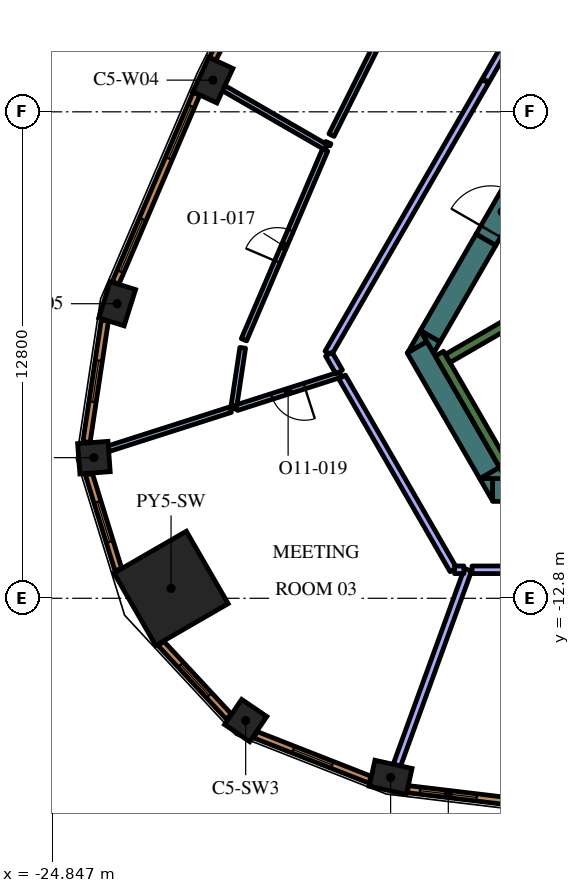
"""IFC4 building model, lengths in metres.
Left out: names, types, materials, properties, quantities, classifications, styles, units other than length and angle.
Written with IfcOpenShell. Run it as: python <this file> out.ifc"""

import sys

from ifc_helpers import new_model, si_unit, direction, frame, frame_2d, origin, origin_2d, place, context, subcontext, project, spatial, polyline, rectangle, outline, extrude, element, fill, save


model = new_model("IFC4")
c1 = context("Model", 3, precision=1e-05, world=origin(), true_north=direction((0.0, 1.0)))
c2 = subcontext(c1, "Body", "Model", "MODEL_VIEW")
j1 = project(units=[si_unit("LENGTHUNIT", "METRE"), si_unit("PLANEANGLEUNIT", "RADIAN")], contexts=[c1])
p1 = place(None, origin())
s1 = spatial("IfcSite", under=j1, at=p1, CompositionType="ELEMENT")
p2 = place(p1, origin())
s2 = spatial("IfcBuilding", under=s1, at=p2, CompositionType="ELEMENT")
p3 = place(p2, frame((0.0, 0.0, 275.4)))
s3 = spatial("IfcBuildingStorey", under=s2, at=p3, CompositionType="ELEMENT", Elevation=275.4)
p4 = place(p3, frame((-21.718, -12.539, 0.0), z_axis=(0.0, 0.0, 1.0), x_axis=(-0.866025403784, -0.5, 0.0)))
e1 = element("IfcColumn", 1, at=p4, inside=s3, PredefinedType="COLUMN", context=c2, shape_type="SweptSolid", body=[
    extrude(rectangle(XDim=2.2, YDim=2.2, at=origin_2d()), origin(), (0.0, 0.0, 1.0), 4.2),
])
for number, where, z_axis, x_axis in (
    (2, (-15.941, -17.512, 0.0), (0.0, 0.0, 1.0), (0.976, -0.217, 0.0)),
    (3, (-20.619, 0.834, 0.0), (0.0, 0.0, 1.0), (-0.421, -0.907, 0.0)),
    (4, (-23.136, -5.049, 0.0), (0.0, 0.0, 1.0), (-0.3, -0.954, 0.0)),
):
    element("IfcColumn", number, at=place(p3, frame(where, z_axis=z_axis, x_axis=x_axis)), inside=s3, PredefinedType="COLUMN", context=c2, shape_type="SweptSolid", body=[
        extrude(rectangle(XDim=1.0, YDim=0.7, at=origin_2d()), origin(), (0.0, 0.0, 1.0), 4.2),
    ])
for number, where, z_axis, x_axis in (
    (5, (-23.748, -9.1, 0.0), (0.0, 0.0, 1.0), (0.075, -0.997, 0.0)),
    (6, (-19.754, -16.017, 0.0), (0.0, 0.0, 1.0), (0.826, -0.563, 0.0)),
):
    element("IfcColumn", number, at=place(p3, frame(where, z_axis=z_axis, x_axis=x_axis)), inside=s3, PredefinedType="COLUMN", context=c2, shape_type="SweptSolid", body=[
        extrude(rectangle(XDim=0.8, YDim=0.8, at=origin_2d()), origin(), (0.0, 0.0, 1.0), 4.2),
    ])
p5 = place(p3, frame((8.904, -9.95, 0.0), z_axis=(0.0, 0.0, 1.0), x_axis=(-1.0, 0.0, 0.0)))
e7 = element("IfcWall", 7, at=p5, inside=s3, PredefinedType="SOLIDWALL", context=c2, shape_type="SweptSolid", body=[
    extrude(rectangle(XDim=22.161, YDim=0.6, at=frame_2d((11.081, 0.0))), origin(), (0.0, 0.0, 1.0), 4.2),
])
p6 = place(p3, origin())
e8 = element("IfcWall", 8, at=p6, inside=s3, PredefinedType="SOLIDWALL", context=c2, shape_type="SweptSolid", body=[
    extrude(outline(polyline([(-13.597, -9.65), (-13.259, -9.65), (-13.259, -10.236), (-13.597, -9.65)])), origin(), (0.0, 0.0, 1.0), 4.2),
])
p7 = place(p3, frame((-13.333, -9.506, 0.0), z_axis=(0.0, 0.0, 1.0), x_axis=(-0.500019073792, 0.866014391245, 0.0)))
e9 = element("IfcWall", 9, at=p7, inside=s3, PredefinedType="SOLIDWALL", context=c2, shape_type="SweptSolid", body=[
    extrude(rectangle(XDim=3.823, YDim=0.6, at=frame_2d((1.912, 0.0))), origin(), (0.0, 0.0, 1.0), 4.2),
])
e10 = element("IfcWall", 10, at=p6, inside=s3, PredefinedType="SOLIDWALL", context=c2, shape_type="SweptSolid", body=[
    extrude(outline(polyline([(-14.987, -6.043), (-15.493, -6.335), (-15.156, -5.75), (-14.987, -6.043)])), origin(), (0.0, 0.0, 1.0), 4.2),
])
e11 = element("IfcWall", 11, at=p6, inside=s3, PredefinedType="SOLIDWALL", context=c2, shape_type="SweptSolid", body=[
    extrude(outline(polyline([(-12.904, -9.65), (-13.58, -9.65), (-13.073, -9.357), (-12.904, -9.65)])), origin(), (0.0, 0.0, 1.0), 4.2),
])
p8 = place(p3, frame((-13.432, -3.364, 0.0), z_axis=(0.0, 0.0, 1.0), x_axis=(-0.499960127962, -0.866048422692, 0.0)))
e12 = element("IfcWall", 12, at=p8, inside=s3, PredefinedType="SOLIDWALL", context=c2, shape_type="SweptSolid", body=[
    extrude(rectangle(XDim=2.934, YDim=0.6, at=frame_2d((1.467, 0.0))), origin(), (0.0, 0.0, 1.0), 4.2),
])
e13 = element("IfcWall", 13, at=p6, inside=s3, PredefinedType="SOLIDWALL", context=c2, shape_type="SweptSolid", body=[
    extrude(outline(polyline([(-14.809, -6.35), (-15.147, -5.764), (-14.64, -6.057), (-14.809, -6.35)])), origin(), (0.0, 0.0, 1.0), 4.2),
])
p9 = place(p3, frame((-12.84, -9.511, 0.0), z_axis=(0.0, 0.0, 1.0), x_axis=(-0.499997733992, 0.866026712061, 0.0)))
e14 = element("IfcWall", 14, at=p9, inside=s3, PredefinedType="SOLIDWALL", context=c2, shape_type="SweptSolid", body=[
    extrude(rectangle(XDim=3.634, YDim=0.25, at=frame_2d((1.817, 0.0))), origin(), (0.0, 0.0, 1.0), 4.2),
])
p10 = place(p3, frame((-14.44, -6.49, 0.0), z_axis=(0.0, 0.0, 1.0), x_axis=(0.866022966069, 0.500004222222, 0.0)))
e15 = element("IfcWall", 15, at=p10, inside=s3, PredefinedType="SOLIDWALL", context=c2, shape_type="SweptSolid", body=[
    extrude(rectangle(XDim=6.8, YDim=0.25, at=frame_2d((3.4, 0.0))), origin(), (0.0, 0.0, 1.0), 4.2),
])
p11 = place(p3, frame((-13.432, -3.364, 0.0), z_axis=(0.0, 0.0, 1.0), x_axis=(0.500000056704, 0.866025371046, 0.0)))
e16 = element("IfcWall", 16, at=p11, inside=s3, PredefinedType="SOLIDWALL", context=c2, shape_type="SweptSolid", body=[
    extrude(rectangle(XDim=1.7, YDim=0.6, at=frame_2d((0.85, 0.0))), origin(), (0.0, 0.0, 1.0), 4.2),
])
p12 = place(p11, frame((0.25, 0.0, 0.0)))
e17 = element("IfcOpeningElement", 17, at=p12, cuts=e16, PredefinedType="OPENING", context=c2, shape_type="SweptSolid", body=[
    extrude(rectangle(XDim=1.2, YDim=2.1, at=frame_2d((0.6, 1.05))), frame((0.0, 0.31, 0.0), z_axis=(0.0, -1.0, 0.0), x_axis=(1.0, 0.0, 0.0)), (0.0, 0.0, 1.0), 0.62),
])
p13 = place(p3, frame((-15.774, -17.19, 0.0), z_axis=(0.0, 0.0, 1.0), x_axis=(0.341821907823, 0.93976474893, 0.0)))
e18 = element("IfcWall", 18, at=p13, inside=s3, PredefinedType="PARTITIONING", context=c2, shape_type="SweptSolid", body=[
    extrude(rectangle(XDim=5.469, YDim=0.2, at=frame_2d((2.735, 0.0))), origin(), (0.0, 0.0, 1.0), 3.55),
])
p14 = place(p3, frame((-13.799, -12.05, 0.0), z_axis=(0.0, 0.0, 1.0), x_axis=(1.0, 0.0, 0.0)))
e19 = element("IfcWall", 19, at=p14, inside=s3, PredefinedType="PARTITIONING", context=c2, shape_type="SweptSolid", body=[
    extrude(rectangle(XDim=7.769, YDim=0.2, at=frame_2d((3.884, 0.0))), origin(), (0.0, 0.0, 1.0), 3.55),
])
p15 = place(p3, frame((-17.635, -0.936, 0.0), z_axis=(0.0, 0.0, 1.0), x_axis=(-0.866044607523, 0.499966736674, 0.0)))
e20 = element("IfcWall", 20, at=p15, inside=s3, PredefinedType="PARTITIONING", context=c2, shape_type="SweptSolid", body=[
    extrude(rectangle(XDim=3.115, YDim=0.15, at=frame_2d((1.557, 0.0))), origin(), (0.0, 0.0, 1.0), 3.55),
])
p16 = place(p3, frame((-17.497, -0.613, 0.0), z_axis=(0.0, 0.0, 1.0), x_axis=(0.447474899467, 0.894296491297, 0.0)))
e21 = element("IfcWall", 21, at=p16, inside=s3, PredefinedType="PARTITIONING", context=c2, shape_type="SweptSolid", body=[
    extrude(rectangle(XDim=5.979, YDim=0.15, at=frame_2d((2.99, 0.0))), origin(), (0.0, 0.0, 1.0), 3.55),
])
p17 = place(p16, frame((2.58, 0.0, 0.0)))
e22 = element("IfcOpeningElement", 22, at=p17, cuts=e21, PredefinedType="OPENING", context=c2, shape_type="SweptSolid", body=[
    extrude(rectangle(XDim=0.9, YDim=2.1, at=frame_2d((0.45, 1.05))), frame((0.0, 0.085, 0.0), z_axis=(0.0, -1.0, 0.0), x_axis=(1.0, 0.0, 0.0)), (0.0, 0.0, 1.0), 0.17),
])
p18 = place(p3, frame((-17.581, -0.81, 0.0), z_axis=(0.0, 0.0, 1.0), x_axis=(-0.390033474923, -0.92080067791, 0.0)))
e23 = element("IfcWall", 23, at=p18, inside=s3, PredefinedType="PARTITIONING", context=c2, shape_type="SweptSolid", body=[
    extrude(rectangle(XDim=0.061, YDim=0.15, at=frame_2d((0.03, 0.0))), origin(), (0.0, 0.0, 1.0), 3.55),
])
p19 = place(p3, frame((-19.8, -5.998, 0.0), z_axis=(0.0, 0.0, 1.0), x_axis=(0.39332238233, 0.919400621904, 0.0)))
e24 = element("IfcWall", 24, at=p19, inside=s3, PredefinedType="PARTITIONING", context=c2, shape_type="SweptSolid", body=[
    extrude(rectangle(XDim=5.431, YDim=0.15, at=frame_2d((2.715, 0.0))), origin(), (0.0, 0.0, 1.0), 3.55),
])
p20 = place(p19, frame((2.231, 0.0, 0.0)))
e25 = element("IfcOpeningElement", 25, at=p20, cuts=e24, PredefinedType="OPENING", context=c2, shape_type="SweptSolid", body=[
    extrude(rectangle(XDim=0.9, YDim=2.1, at=frame_2d((0.45, 1.05))), frame((0.0, 0.085, 0.0), z_axis=(0.0, -1.0, 0.0), x_axis=(1.0, 0.0, 0.0)), (0.0, 0.0, 1.0), 0.17),
])
p21 = place(p3, frame((-19.833, -6.21, 0.0), z_axis=(0.0, 0.0, 1.0), x_axis=(-0.149305499664, -0.988791114326, 0.0)))
e26 = element("IfcWall", 26, at=p21, inside=s3, PredefinedType="PARTITIONING", context=c2, shape_type="SweptSolid", body=[
    extrude(rectangle(XDim=1.62, YDim=0.15, at=frame_2d((0.81, 0.0))), origin(), (0.0, 0.0, 1.0), 3.55),
])
p22 = place(p3, frame((-20.154, -7.838, 0.0), z_axis=(0.0, 0.0, 1.0), x_axis=(-0.952501497002, -0.304533903217, 0.0)))
e27 = element("IfcWall", 27, at=p22, inside=s3, PredefinedType="PARTITIONING", context=c2, shape_type="SweptSolid", body=[
    extrude(rectangle(XDim=3.37, YDim=0.15, at=frame_2d((1.685, 0.0))), origin(), (0.0, 0.0, 1.0), 3.55),
])
p23 = place(p3, frame((-17.256, -6.911, 0.0), z_axis=(0.0, 0.0, 1.0), x_axis=(-0.95247639241, -0.304612412587, 0.0)))
e28 = element("IfcWall", 28, at=p23, inside=s3, PredefinedType="PARTITIONING", context=c2, shape_type="SweptSolid", body=[
    extrude(rectangle(XDim=2.875, YDim=0.15, at=frame_2d((1.438, 0.0))), origin(), (0.0, 0.0, 1.0), 3.55),
])
p24 = place(p23, frame((1.0, 0.0, 0.0)))
e29 = element("IfcOpeningElement", 29, at=p24, cuts=e28, PredefinedType="OPENING", context=c2, shape_type="SweptSolid", body=[
    extrude(rectangle(XDim=0.9, YDim=2.1, at=frame_2d((0.45, 1.05))), frame((0.0, 0.085, 0.0), z_axis=(0.0, -1.0, 0.0), x_axis=(1.0, 0.0, 0.0)), (0.0, 0.0, 1.0), 0.17),
])
p25 = place(p3, frame((-7.436, 11.221, 0.0), z_axis=(0.0, 0.0, 1.0), x_axis=(-0.49999894854, -0.866026010844, 0.0)))
e30 = element("IfcWall", 30, at=p25, inside=s3, PredefinedType="PARTITIONING", context=c2, shape_type="SweptSolid", body=[
    extrude(rectangle(XDim=12.0, YDim=0.2, at=frame_2d((6.0, 0.0))), origin(), (0.0, 0.0, 1.0), 3.55),
])
p26 = place(p25, frame((5.5, 0.0, 0.0)))
e31 = element("IfcOpeningElement", 31, at=p26, cuts=e30, PredefinedType="OPENING", context=c2, shape_type="SweptSolid", body=[
    extrude(rectangle(XDim=1.0, YDim=2.1, at=frame_2d((0.5, 1.05))), frame((0.0, 0.11, 0.0), z_axis=(0.0, -1.0, 0.0), x_axis=(1.0, 0.0, 0.0)), (0.0, 0.0, 1.0), 0.22),
])
p27 = place(p3, frame((-13.451, 0.803, 0.0), z_axis=(0.0, 0.0, 1.0), x_axis=(-0.499982585408, -0.86603545787, 0.0)))
e32 = element("IfcWall", 32, at=p27, inside=s3, PredefinedType="PARTITIONING", context=c2, shape_type="SweptSolid", body=[
    extrude(rectangle(XDim=8.26, YDim=0.2, at=frame_2d((4.13, 0.0))), origin(), (0.0, 0.0, 1.0), 3.55),
])
p28 = place(p3, frame((-17.565, -6.376, 0.0), z_axis=(0.0, 0.0, 1.0), x_axis=(0.499683376352, -0.866208129376, 0.0)))
e33 = element("IfcWall", 33, at=p28, inside=s3, PredefinedType="PARTITIONING", context=c2, shape_type="SweptSolid", body=[
    extrude(rectangle(XDim=0.541, YDim=0.2, at=frame_2d((0.271, 0.0))), origin(), (0.0, 0.0, 1.0), 3.55),
])
p29 = place(p3, frame((-17.218, -6.978, 0.0), z_axis=(0.0, 0.0, 1.0), x_axis=(0.500012299885, -0.866018302326, 0.0)))
e34 = element("IfcWall", 34, at=p29, inside=s3, PredefinedType="PARTITIONING", context=c2, shape_type="SweptSolid", body=[
    extrude(rectangle(XDim=5.857, YDim=0.2, at=frame_2d((2.929, 0.0))), origin(), (0.0, 0.0, 1.0), 3.55),
])
p30 = place(p3, frame((-14.26, -12.05, 0.0), z_axis=(0.0, 0.0, 1.0), x_axis=(1.0, 0.0, 0.0)))
e35 = element("IfcWall", 35, at=p30, inside=s3, PredefinedType="PARTITIONING", context=c2, shape_type="SweptSolid", body=[
    extrude(rectangle(XDim=0.248, YDim=0.2, at=frame_2d((0.124, 0.0))), origin(), (0.0, 0.0, 1.0), 3.55),
])
p31 = place(p3, frame((-15.487, -17.823, 0.0), z_axis=(0.0, 0.0, 1.0), x_axis=(0.992885582795, -0.119072328769, 0.0)))
e36 = element("IfcWall", 36, at=p31, inside=s3, PredefinedType="SOLIDWALL", context=c2, shape_type="SweptSolid", body=[
    extrude(rectangle(XDim=5.415, YDim=0.19, at=frame_2d((2.708, 0.0))), origin(), (0.0, 0.0, 1.0), 3.95),
])
p32 = place(p31, frame((0.323, 0.0, 0.6)))
e37 = element("IfcOpeningElement", 37, at=p32, cuts=e36, PredefinedType="OPENING", context=c2, shape_type="SweptSolid", body=[
    extrude(rectangle(XDim=1.5, YDim=2.85, at=frame_2d((0.75, 1.425))), frame((0.0, 0.105, 0.0), z_axis=(0.0, -1.0, 0.0), x_axis=(1.0, 0.0, 0.0)), (0.0, 0.0, 1.0), 0.21),
])
p33 = place(p31, frame((3.558, 0.0, 0.6)))
e38 = element("IfcOpeningElement", 38, at=p33, cuts=e36, PredefinedType="OPENING", context=c2, shape_type="SweptSolid", body=[
    extrude(rectangle(XDim=1.5, YDim=2.85, at=frame_2d((0.75, 1.425))), frame((0.0, 0.105, 0.0), z_axis=(0.0, -1.0, 0.0), x_axis=(1.0, 0.0, 0.0)), (0.0, 0.0, 1.0), 0.21),
])
p34 = place(p3, frame((-18.206, 6.227, 0.0), z_axis=(0.0, 0.0, 1.0), x_axis=(-0.447484531401, -0.894291671747, 0.0)))
e39 = element("IfcWall", 39, at=p34, inside=s3, PredefinedType="SOLIDWALL", context=c2, shape_type="SweptSolid", body=[
    extrude(rectangle(XDim=5.406, YDim=0.19, at=frame_2d((2.703, 0.0))), origin(), (0.0, 0.0, 1.0), 3.95),
])
p35 = place(p34, frame((0.346, 0.0, 0.6)))
e40 = element("IfcOpeningElement", 40, at=p35, cuts=e39, PredefinedType="OPENING", context=c2, shape_type="SweptSolid", body=[
    extrude(rectangle(XDim=1.5, YDim=2.85, at=frame_2d((0.75, 1.425))), frame((0.0, 0.105, 0.0), z_axis=(0.0, -1.0, 0.0), x_axis=(1.0, 0.0, 0.0)), (0.0, 0.0, 1.0), 0.21),
])
p36 = place(p34, frame((3.559, 0.0, 0.6)))
e41 = element("IfcOpeningElement", 41, at=p36, cuts=e39, PredefinedType="OPENING", context=c2, shape_type="SweptSolid", body=[
    extrude(rectangle(XDim=1.5, YDim=2.85, at=frame_2d((0.75, 1.425))), frame((0.0, 0.105, 0.0), z_axis=(0.0, -1.0, 0.0), x_axis=(1.0, 0.0, 0.0)), (0.0, 0.0, 1.0), 0.21),
])
p37 = place(p3, frame((-21.049, 0.478, 0.0), z_axis=(0.0, 0.0, 1.0), x_axis=(-0.393347848476, -0.919389726992, 0.0)))
e42 = element("IfcWall", 42, at=p37, inside=s3, PredefinedType="SOLIDWALL", context=c2, shape_type="SweptSolid", body=[
    extrude(rectangle(XDim=5.415, YDim=0.19, at=frame_2d((2.708, 0.0))), origin(), (0.0, 0.0, 1.0), 3.95),
])
p38 = place(p37, frame((0.357, 0.0, 0.6)))
e43 = element("IfcOpeningElement", 43, at=p38, cuts=e42, PredefinedType="OPENING", context=c2, shape_type="SweptSolid", body=[
    extrude(rectangle(XDim=1.5, YDim=2.85, at=frame_2d((0.75, 1.425))), frame((0.0, 0.105, 0.0), z_axis=(0.0, -1.0, 0.0), x_axis=(1.0, 0.0, 0.0)), (0.0, 0.0, 1.0), 0.21),
])
p39 = place(p37, frame((3.593, 0.0, 0.6)))
e44 = element("IfcOpeningElement", 44, at=p39, cuts=e42, PredefinedType="OPENING", context=c2, shape_type="SweptSolid", body=[
    extrude(rectangle(XDim=1.5, YDim=2.85, at=frame_2d((0.75, 1.425))), frame((0.0, 0.105, 0.0), z_axis=(0.0, -1.0, 0.0), x_axis=(1.0, 0.0, 0.0)), (0.0, 0.0, 1.0), 0.21),
])
p40 = place(p3, frame((-23.46, -5.488, 0.0), z_axis=(0.0, 0.0, 1.0), x_axis=(-0.149421055602, -0.988773658702, 0.0)))
e45 = element("IfcWall", 45, at=p40, inside=s3, PredefinedType="SOLIDWALL", context=c2, shape_type="SweptSolid", body=[
    extrude(rectangle(XDim=3.237, YDim=0.19, at=frame_2d((1.618, 0.0))), origin(), (0.0, 0.0, 1.0), 3.95),
])
p41 = place(p40, frame((1.068, 0.0, 0.6)))
e46 = element("IfcOpeningElement", 46, at=p41, cuts=e45, PredefinedType="OPENING", context=c2, shape_type="SweptSolid", body=[
    extrude(rectangle(XDim=1.1, YDim=2.85, at=frame_2d((0.55, 1.425))), frame((0.0, 0.105, 0.0), z_axis=(0.0, -1.0, 0.0), x_axis=(1.0, 0.0, 0.0)), (0.0, 0.0, 1.0), 0.21),
])
p42 = place(p3, frame((-23.881, -9.535, 0.0), z_axis=(0.0, 0.0, 1.0), x_axis=(0.294706210429, -0.9555879078, 0.0)))
e47 = element("IfcWall", 47, at=p42, inside=s3, PredefinedType="SOLIDWALL", context=c2, shape_type="SweptSolid", body=[
    extrude(rectangle(XDim=2.627, YDim=0.19, at=frame_2d((1.313, 0.0))), origin(), (0.0, 0.0, 1.0), 3.95),
])
p43 = place(p42, frame((0.763, 0.0, 0.6)))
e48 = element("IfcOpeningElement", 48, at=p43, cuts=e47, PredefinedType="OPENING", context=c2, shape_type="SweptSolid", body=[
    extrude(rectangle(XDim=1.1, YDim=2.85, at=frame_2d((0.55, 1.425))), frame((0.0, 0.105, 0.0), z_axis=(0.0, -1.0, 0.0), x_axis=(1.0, 0.0, 0.0)), (0.0, 0.0, 1.0), 0.21),
])
p44 = place(p3, frame((-21.985, -13.988, 0.0), z_axis=(0.0, 0.0, 1.0), x_axis=(0.680219354823, -0.733008614768, 0.0)))
e49 = element("IfcWall", 49, at=p44, inside=s3, PredefinedType="SOLIDWALL", context=c2, shape_type="SweptSolid", body=[
    extrude(rectangle(XDim=2.627, YDim=0.19, at=frame_2d((1.313, 0.0))), origin(), (0.0, 0.0, 1.0), 3.95),
])
p45 = place(p44, frame((0.763, 0.0, 0.6)))
e50 = element("IfcOpeningElement", 50, at=p45, cuts=e49, PredefinedType="OPENING", context=c2, shape_type="SweptSolid", body=[
    extrude(rectangle(XDim=1.1, YDim=2.85, at=frame_2d((0.55, 1.425))), frame((0.0, 0.105, 0.0), z_axis=(0.0, -1.0, 0.0), x_axis=(1.0, 0.0, 0.0)), (0.0, 0.0, 1.0), 0.21),
])
p46 = place(p3, frame((-19.496, -16.392, 0.0), z_axis=(0.0, 0.0, 1.0), x_axis=(0.93100888477, -0.364996515709, 0.0)))
e51 = element("IfcWall", 51, at=p46, inside=s3, PredefinedType="SOLIDWALL", context=c2, shape_type="SweptSolid", body=[
    extrude(rectangle(XDim=3.237, YDim=0.19, at=frame_2d((1.618, 0.0))), origin(), (0.0, 0.0, 1.0), 3.95),
])
p47 = place(p46, frame((1.068, 0.0, 0.6)))
e52 = element("IfcOpeningElement", 52, at=p47, cuts=e51, PredefinedType="OPENING", context=c2, shape_type="SweptSolid", body=[
    extrude(rectangle(XDim=1.1, YDim=2.85, at=frame_2d((0.55, 1.425))), frame((0.0, 0.105, 0.0), z_axis=(0.0, -1.0, 0.0), x_axis=(1.0, 0.0, 0.0)), (0.0, 0.0, 1.0), 0.21),
])
p48 = place(p12, origin())
e53 = element("IfcDoor", 53, at=p48, inside=s3, OperationType="SINGLE_SWING_LEFT", PredefinedType="DOOR", context=c2, shape_type="SweptSolid", body=[
    extrude(rectangle(XDim=1.2, YDim=2.1, at=frame_2d((0.6, 1.05))), frame((0.0, 0.025, 0.0), z_axis=(0.0, -1.0, 0.0), x_axis=(1.0, 0.0, 0.0)), (0.0, 0.0, 1.0), 0.05),
])
fill(e17, e53)
p49 = place(p20, origin())
e54 = element("IfcDoor", 54, at=p49, inside=s3, OperationType="SINGLE_SWING_LEFT", PredefinedType="DOOR", context=c2, shape_type="SweptSolid", body=[
    extrude(rectangle(XDim=0.9, YDim=2.1, at=frame_2d((0.45, 1.05))), frame((0.0, 0.025, 0.0), z_axis=(0.0, -1.0, 0.0), x_axis=(1.0, 0.0, 0.0)), (0.0, 0.0, 1.0), 0.05),
])
fill(e25, e54)
p50 = place(p24, origin())
e55 = element("IfcDoor", 55, at=p50, inside=s3, OperationType="SINGLE_SWING_RIGHT", PredefinedType="DOOR", context=c2, shape_type="SweptSolid", body=[
    extrude(rectangle(XDim=0.9, YDim=2.1, at=frame_2d((0.45, 1.05))), frame((0.0, 0.025, 0.0), z_axis=(0.0, -1.0, 0.0), x_axis=(1.0, 0.0, 0.0)), (0.0, 0.0, 1.0), 0.05),
])
fill(e29, e55)
p51 = place(p32, origin())
e56 = element("IfcWindow", 56, at=p51, inside=s3, PartitioningType="SINGLE_PANEL", PredefinedType="WINDOW", context=c2, shape_type="SweptSolid", body=[
    extrude(rectangle(XDim=1.5, YDim=2.85, at=frame_2d((0.75, 1.425))), frame((0.0, 0.045, 0.0), z_axis=(0.0, -1.0, 0.0), x_axis=(1.0, 0.0, 0.0)), (0.0, 0.0, 1.0), 0.06),
])
fill(e37, e56)
p52 = place(p38, origin())
e57 = element("IfcWindow", 57, at=p52, inside=s3, PartitioningType="SINGLE_PANEL", PredefinedType="WINDOW", context=c2, shape_type="SweptSolid", body=[
    extrude(rectangle(XDim=1.5, YDim=2.85, at=frame_2d((0.75, 1.425))), frame((0.0, 0.045, 0.0), z_axis=(0.0, -1.0, 0.0), x_axis=(1.0, 0.0, 0.0)), (0.0, 0.0, 1.0), 0.06),
])
fill(e43, e57)
p53 = place(p39, origin())
e58 = element("IfcWindow", 58, at=p53, inside=s3, PartitioningType="SINGLE_PANEL", PredefinedType="WINDOW", context=c2, shape_type="SweptSolid", body=[
    extrude(rectangle(XDim=1.5, YDim=2.85, at=frame_2d((0.75, 1.425))), frame((0.0, 0.045, 0.0), z_axis=(0.0, -1.0, 0.0), x_axis=(1.0, 0.0, 0.0)), (0.0, 0.0, 1.0), 0.06),
])
fill(e44, e58)
p54 = place(p41, origin())
e59 = element("IfcWindow", 59, at=p54, inside=s3, PartitioningType="SINGLE_PANEL", PredefinedType="WINDOW", context=c2, shape_type="SweptSolid", body=[
    extrude(rectangle(XDim=1.1, YDim=2.85, at=frame_2d((0.55, 1.425))), frame((0.0, 0.045, 0.0), z_axis=(0.0, -1.0, 0.0), x_axis=(1.0, 0.0, 0.0)), (0.0, 0.0, 1.0), 0.06),
])
fill(e46, e59)
p55 = place(p43, origin())
e60 = element("IfcWindow", 60, at=p55, inside=s3, PartitioningType="SINGLE_PANEL", PredefinedType="WINDOW", context=c2, shape_type="SweptSolid", body=[
    extrude(rectangle(XDim=1.1, YDim=2.85, at=frame_2d((0.55, 1.425))), frame((0.0, 0.045, 0.0), z_axis=(0.0, -1.0, 0.0), x_axis=(1.0, 0.0, 0.0)), (0.0, 0.0, 1.0), 0.06),
])
fill(e48, e60)
p56 = place(p45, origin())
e61 = element("IfcWindow", 61, at=p56, inside=s3, PartitioningType="SINGLE_PANEL", PredefinedType="WINDOW", context=c2, shape_type="SweptSolid", body=[
    extrude(rectangle(XDim=1.1, YDim=2.85, at=frame_2d((0.55, 1.425))), frame((0.0, 0.045, 0.0), z_axis=(0.0, -1.0, 0.0), x_axis=(1.0, 0.0, 0.0)), (0.0, 0.0, 1.0), 0.06),
])
fill(e50, e61)
p57 = place(p47, origin())
e62 = element("IfcWindow", 62, at=p57, inside=s3, PartitioningType="SINGLE_PANEL", PredefinedType="WINDOW", context=c2, shape_type="SweptSolid", body=[
    extrude(rectangle(XDim=1.1, YDim=2.85, at=frame_2d((0.55, 1.425))), frame((0.0, 0.045, 0.0), z_axis=(0.0, -1.0, 0.0), x_axis=(1.0, 0.0, 0.0)), (0.0, 0.0, 1.0), 0.06),
])
fill(e52, e62)
save(model, sys.argv[1])
